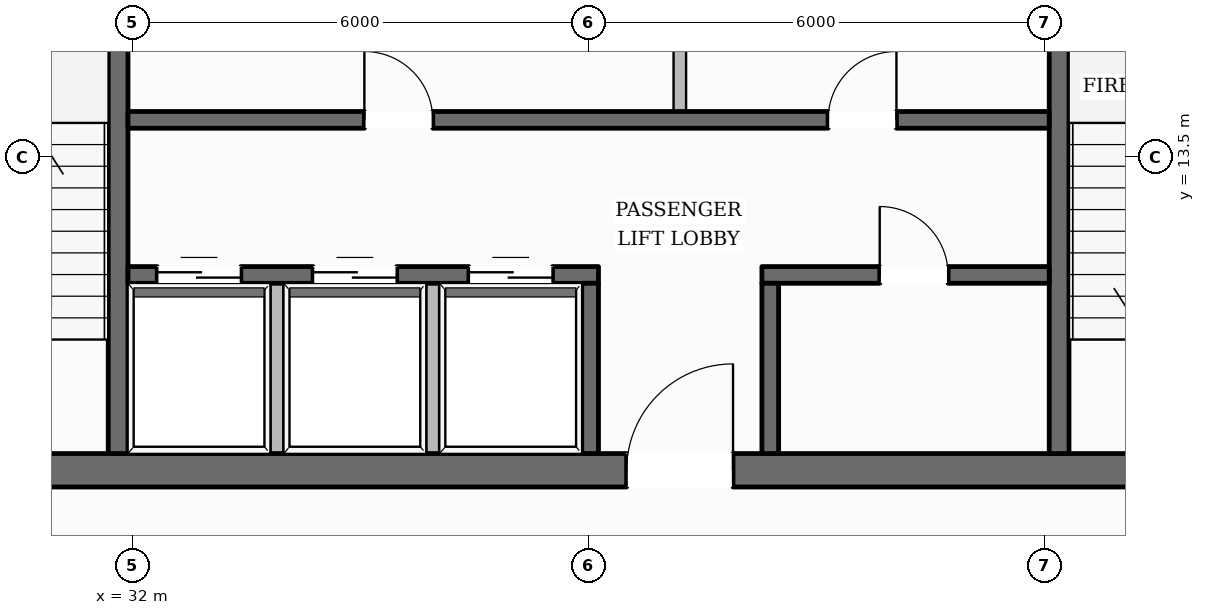
"""IFC4 building model, lengths in metres.
Left out: names, types, materials, properties, quantities, classifications, styles, units other than length and angle.
Written with IfcOpenShell. Run it as: python <this file> out.ifc"""

import sys

from ifc_helpers import new_model, si_unit, direction, frame, frame_2d, origin, place, context, subcontext, project, spatial, rectangle, extrude, element, fill, save


model = new_model("IFC4")
c1 = context("Model", 3, precision=1e-05, world=origin(), true_north=direction((0.0, 1.0)))
c2 = subcontext(c1, "Body", "Model", "MODEL_VIEW")
j1 = project(units=[si_unit("LENGTHUNIT", "METRE"), si_unit("PLANEANGLEUNIT", "RADIAN")], contexts=[c1])
p1 = place(None, origin())
s1 = spatial("IfcSite", under=j1, at=p1, CompositionType="ELEMENT")
p2 = place(p1, origin())
s2 = spatial("IfcBuilding", under=s1, at=p2, CompositionType="ELEMENT")
p3 = place(p2, frame((0.0, 0.0, 188.1)))
s3 = spatial("IfcBuildingStorey", under=s2, at=p3, CompositionType="ELEMENT", Elevation=188.1)
p4 = place(p3, frame((28.04, 9.38, 0.0), z_axis=(0.0, 0.0, 1.0), x_axis=(1.0, 0.0, 0.0)))
e1 = element("IfcWall", 1, at=p4, inside=s3, PredefinedType="SOLIDWALL", context=c2, shape_type="SweptSolid", body=[
    extrude(rectangle(XDim=19.92, YDim=0.44, at=frame_2d((9.96, 0.0))), origin(), (0.0, 0.0, 1.0), 3.6),
])
p5 = place(p4, frame((10.46, 0.0, 0.0)))
e2 = element("IfcOpeningElement", 2, at=p5, cuts=e1, PredefinedType="OPENING", context=c2, shape_type="SweptSolid", body=[
    extrude(rectangle(XDim=1.4, YDim=2.2, at=frame_2d((0.7, 1.1))), frame((0.0, 0.23, 0.0), z_axis=(0.0, -1.0, 0.0), x_axis=(1.0, 0.0, 0.0)), (0.0, 0.0, 1.0), 0.46),
])
p6 = place(p3, frame((31.81, 9.6, 0.0), z_axis=(0.0, 0.0, 1.0), x_axis=(0.0, 1.0, 0.0)))
e3 = element("IfcWall", 3, at=p6, inside=s3, PredefinedType="SHEAR", context=c2, shape_type="SweptSolid", body=[
    extrude(rectangle(XDim=13.0, YDim=0.26, at=frame_2d((6.5, 0.0))), origin(), (0.0, 0.0, 1.0), 3.6),
])
p7 = place(p6, frame((10.925, 0.0, 0.0)))
e4 = element("IfcOpeningElement", 4, at=p7, cuts=e3, PredefinedType="OPENING", context=c2, shape_type="SweptSolid", body=[
    extrude(rectangle(XDim=1.25, YDim=2.25, at=frame_2d((0.625, 1.125))), frame((0.0, 0.14, 0.0), z_axis=(0.0, -1.0, 0.0), x_axis=(1.0, 0.0, 0.0)), (0.0, 0.0, 1.0), 0.28),
])
p8 = place(p3, frame((44.19, 9.6, 0.0), z_axis=(0.0, 0.0, 1.0), x_axis=(0.0, 1.0, 0.0)))
e5 = element("IfcWall", 5, at=p8, inside=s3, PredefinedType="SHEAR", context=c2, shape_type="SweptSolid", body=[
    extrude(rectangle(XDim=13.0, YDim=0.26, at=frame_2d((6.5, 0.0))), origin(), (0.0, 0.0, 1.0), 3.6),
])
p9 = place(p8, frame((10.925, 0.0, 0.0)))
e6 = element("IfcOpeningElement", 6, at=p9, cuts=e5, PredefinedType="OPENING", context=c2, shape_type="SweptSolid", body=[
    extrude(rectangle(XDim=1.25, YDim=2.25, at=frame_2d((0.625, 1.125))), frame((0.0, 0.14, 0.0), z_axis=(0.0, -1.0, 0.0), x_axis=(1.0, 0.0, 0.0)), (0.0, 0.0, 1.0), 0.28),
])
p10 = place(p3, frame((31.94, 13.99, 0.0), z_axis=(0.0, 0.0, 1.0), x_axis=(1.0, 0.0, 0.0)))
e7 = element("IfcWall", 7, at=p10, inside=s3, PredefinedType="SOLIDWALL", context=c2, shape_type="SweptSolid", body=[
    extrude(rectangle(XDim=12.12, YDim=0.22, at=frame_2d((6.06, 0.0))), origin(), (0.0, 0.0, 1.0), 3.6),
])
p11 = place(p10, frame((3.11, 0.0, 0.0)))
e8 = element("IfcOpeningElement", 8, at=p11, cuts=e7, PredefinedType="OPENING", context=c2, shape_type="SweptSolid", body=[
    extrude(rectangle(XDim=0.9, YDim=2.1, at=frame_2d((0.45, 1.05))), frame((0.0, 0.12, 0.0), z_axis=(0.0, -1.0, 0.0), x_axis=(1.0, 0.0, 0.0)), (0.0, 0.0, 1.0), 0.24),
])
p12 = place(p10, frame((9.21, 0.0, 0.0)))
e9 = element("IfcOpeningElement", 9, at=p12, cuts=e7, PredefinedType="OPENING", context=c2, shape_type="SweptSolid", body=[
    extrude(rectangle(XDim=0.9, YDim=2.1, at=frame_2d((0.45, 1.05))), frame((0.0, 0.12, 0.0), z_axis=(0.0, -1.0, 0.0), x_axis=(1.0, 0.0, 0.0)), (0.0, 0.0, 1.0), 0.24),
])
p13 = place(p3, frame((31.94, 11.95, 0.0), z_axis=(0.0, 0.0, 1.0), x_axis=(1.0, 0.0, 0.0)))
e10 = element("IfcWall", 10, at=p13, inside=s3, PredefinedType="SOLIDWALL", context=c2, shape_type="SweptSolid", body=[
    extrude(rectangle(XDim=6.19, YDim=0.22, at=frame_2d((3.095, 0.0))), origin(), (0.0, 0.0, 1.0), 3.6),
])
p14 = place(p13, frame((0.385, 0.0, 0.0)))
e11 = element("IfcOpeningElement", 11, at=p14, cuts=e10, PredefinedType="OPENING", context=c2, shape_type="SweptSolid", body=[
    extrude(rectangle(XDim=1.1, YDim=2.2, at=frame_2d((0.55, 1.1))), frame((0.0, 0.12, 0.0), z_axis=(0.0, -1.0, 0.0), x_axis=(1.0, 0.0, 0.0)), (0.0, 0.0, 1.0), 0.24),
])
p15 = place(p13, frame((2.435, 0.0, 0.0)))
e12 = element("IfcOpeningElement", 12, at=p15, cuts=e10, PredefinedType="OPENING", context=c2, shape_type="SweptSolid", body=[
    extrude(rectangle(XDim=1.1, YDim=2.2, at=frame_2d((0.55, 1.1))), frame((0.0, 0.12, 0.0), z_axis=(0.0, -1.0, 0.0), x_axis=(1.0, 0.0, 0.0)), (0.0, 0.0, 1.0), 0.24),
])
p16 = place(p13, frame((4.485, 0.0, 0.0)))
e13 = element("IfcOpeningElement", 13, at=p16, cuts=e10, PredefinedType="OPENING", context=c2, shape_type="SweptSolid", body=[
    extrude(rectangle(XDim=1.1, YDim=2.2, at=frame_2d((0.55, 1.1))), frame((0.0, 0.12, 0.0), z_axis=(0.0, -1.0, 0.0), x_axis=(1.0, 0.0, 0.0)), (0.0, 0.0, 1.0), 0.24),
])
p17 = place(p3, frame((40.28, 11.95, 0.0), z_axis=(0.0, 0.0, 1.0), x_axis=(1.0, 0.0, 0.0)))
e14 = element("IfcWall", 14, at=p17, inside=s3, PredefinedType="SOLIDWALL", context=c2, shape_type="SweptSolid", body=[
    extrude(rectangle(XDim=3.78, YDim=0.22, at=frame_2d((1.89, 0.0))), origin(), (0.0, 0.0, 1.0), 3.6),
])
p18 = place(p17, frame((1.55, 0.0, 0.0)))
e15 = element("IfcOpeningElement", 15, at=p18, cuts=e14, PredefinedType="OPENING", context=c2, shape_type="SweptSolid", body=[
    extrude(rectangle(XDim=0.9, YDim=2.1, at=frame_2d((0.45, 1.05))), frame((0.0, 0.12, 0.0), z_axis=(0.0, -1.0, 0.0), x_axis=(1.0, 0.0, 0.0)), (0.0, 0.0, 1.0), 0.24),
])
for number, where, z_axis, x_axis in (
    (16, (38.02, 9.6, 0.0), (0.0, 0.0, 1.0), (0.0, 1.0, 0.0)),
    (17, (40.39, 9.6, 0.0), (0.0, 0.0, 1.0), (0.0, 1.0, 0.0)),
):
    element("IfcWall", number, at=place(p3, frame(where, z_axis=z_axis, x_axis=x_axis)), inside=s3, PredefinedType="SOLIDWALL", context=c2, shape_type="SweptSolid", body=[
        extrude(rectangle(XDim=2.24, YDim=0.22, at=frame_2d((1.12, 0.0))), origin(), (0.0, 0.0, 1.0), 3.6),
    ])
p19 = place(p3, frame((15.064, 11.953, 0.0), z_axis=(0.0, 0.0, 1.0), x_axis=(0.495993114815, 0.86832645362, 0.0)))
e18 = element("IfcWall", 18, at=p19, inside=s3, PredefinedType="STANDARD", context=c2, shape_type="SweptSolid", body=[
    extrude(rectangle(XDim=37.324, YDim=0.35, at=frame_2d((18.662, 0.0))), origin(), (0.0, 0.0, 1.0), 3.132),
])
p20 = place(p19, frame((33.087, 0.0, 0.65)))
e19 = element("IfcOpeningElement", 19, at=p20, cuts=e18, PredefinedType="OPENING", context=c2, shape_type="SweptSolid", body=[
    extrude(rectangle(XDim=1.45, YDim=1.75, at=frame_2d((0.725, 0.875))), frame((0.0, 0.185, 0.0), z_axis=(0.0, -1.0, 0.0), x_axis=(1.0, 0.0, 0.0)), (0.0, 0.0, 1.0), 0.37),
])
p21 = place(p19, frame((27.026, 0.0, 0.65)))
e20 = element("IfcOpeningElement", 20, at=p21, cuts=e18, PredefinedType="OPENING", context=c2, shape_type="SweptSolid", body=[
    extrude(rectangle(XDim=1.45, YDim=1.75, at=frame_2d((0.725, 0.875))), frame((0.0, 0.185, 0.0), z_axis=(0.0, -1.0, 0.0), x_axis=(1.0, 0.0, 0.0)), (0.0, 0.0, 1.0), 0.37),
])
p22 = place(p19, frame((14.904, 0.0, 0.65)))
e21 = element("IfcOpeningElement", 21, at=p22, cuts=e18, PredefinedType="OPENING", context=c2, shape_type="SweptSolid", body=[
    extrude(rectangle(XDim=1.45, YDim=1.75, at=frame_2d((0.725, 0.875))), frame((0.0, 0.185, 0.0), z_axis=(0.0, -1.0, 0.0), x_axis=(1.0, 0.0, 0.0)), (0.0, 0.0, 1.0), 0.37),
])
p23 = place(p19, frame((8.844, 0.0, 0.65)))
e22 = element("IfcOpeningElement", 22, at=p23, cuts=e18, PredefinedType="OPENING", context=c2, shape_type="SweptSolid", body=[
    extrude(rectangle(XDim=1.45, YDim=1.75, at=frame_2d((0.725, 0.875))), frame((0.0, 0.185, 0.0), z_axis=(0.0, -1.0, 0.0), x_axis=(1.0, 0.0, 0.0)), (0.0, 0.0, 1.0), 0.37),
])
p24 = place(p19, frame((2.782, 0.0, 0.65)))
e23 = element("IfcOpeningElement", 23, at=p24, cuts=e18, PredefinedType="OPENING", context=c2, shape_type="SweptSolid", body=[
    extrude(rectangle(XDim=1.45, YDim=1.75, at=frame_2d((0.725, 0.875))), frame((0.0, 0.185, 0.0), z_axis=(0.0, -1.0, 0.0), x_axis=(1.0, 0.0, 0.0)), (0.0, 0.0, 1.0), 0.37),
])
p25 = place(p3, frame((42.575, 44.272, 0.0), z_axis=(0.0, 0.0, 1.0), x_axis=(0.503934681705, -0.863741764982, 0.0)))
e24 = element("IfcWall", 24, at=p25, inside=s3, PredefinedType="STANDARD", context=c2, shape_type="SweptSolid", body=[
    extrude(rectangle(XDim=37.915, YDim=0.35, at=frame_2d((18.958, 0.0))), origin(), (0.0, 0.0, 1.0), 3.132),
])
p26 = place(p25, frame((33.633, 0.0, 0.65)))
e25 = element("IfcOpeningElement", 25, at=p26, cuts=e24, PredefinedType="OPENING", context=c2, shape_type="SweptSolid", body=[
    extrude(rectangle(XDim=1.45, YDim=1.75, at=frame_2d((0.725, 0.875))), frame((0.0, 0.185, 0.0), z_axis=(0.0, -1.0, 0.0), x_axis=(1.0, 0.0, 0.0)), (0.0, 0.0, 1.0), 0.37),
])
p27 = place(p25, frame((27.472, 0.0, 0.65)))
e26 = element("IfcOpeningElement", 26, at=p27, cuts=e24, PredefinedType="OPENING", context=c2, shape_type="SweptSolid", body=[
    extrude(rectangle(XDim=1.45, YDim=1.75, at=frame_2d((0.725, 0.875))), frame((0.0, 0.185, 0.0), z_axis=(0.0, -1.0, 0.0), x_axis=(1.0, 0.0, 0.0)), (0.0, 0.0, 1.0), 0.37),
])
p28 = place(p25, frame((15.15, 0.0, 0.65)))
e27 = element("IfcOpeningElement", 27, at=p28, cuts=e24, PredefinedType="OPENING", context=c2, shape_type="SweptSolid", body=[
    extrude(rectangle(XDim=1.45, YDim=1.75, at=frame_2d((0.725, 0.875))), frame((0.0, 0.185, 0.0), z_axis=(0.0, -1.0, 0.0), x_axis=(1.0, 0.0, 0.0)), (0.0, 0.0, 1.0), 0.37),
])
p29 = place(p25, frame((8.989, 0.0, 0.65)))
e28 = element("IfcOpeningElement", 28, at=p29, cuts=e24, PredefinedType="OPENING", context=c2, shape_type="SweptSolid", body=[
    extrude(rectangle(XDim=1.45, YDim=1.75, at=frame_2d((0.725, 0.875))), frame((0.0, 0.185, 0.0), z_axis=(0.0, -1.0, 0.0), x_axis=(1.0, 0.0, 0.0)), (0.0, 0.0, 1.0), 0.37),
])
p30 = place(p25, frame((2.828, 0.0, 0.65)))
e29 = element("IfcOpeningElement", 29, at=p30, cuts=e24, PredefinedType="OPENING", context=c2, shape_type="SweptSolid", body=[
    extrude(rectangle(XDim=1.45, YDim=1.75, at=frame_2d((0.725, 0.875))), frame((0.0, 0.185, 0.0), z_axis=(0.0, -1.0, 0.0), x_axis=(1.0, 0.0, 0.0)), (0.0, 0.0, 1.0), 0.37),
])
for number, where, z_axis, x_axis in (
    (30, (33.9, 9.52, 0.0), (0.0, 0.0, 1.0), (0.0, 1.0, 0.0)),
    (31, (35.95, 9.52, 0.0), (0.0, 0.0, 1.0), (0.0, 1.0, 0.0)),
):
    element("IfcWall", number, at=place(p3, frame(where, z_axis=z_axis, x_axis=x_axis)), inside=s3, PredefinedType="PARTITIONING", context=c2, shape_type="SweptSolid", body=[
        extrude(rectangle(XDim=2.32, YDim=0.165, at=frame_2d((1.16, 0.0))), origin(), (0.0, 0.0, 1.0), 3.6),
    ])
p31 = place(p3, frame((39.2, 14.1, 0.0), z_axis=(0.0, 0.0, 1.0), x_axis=(0.0, 1.0, 0.0)))
e32 = element("IfcWall", 32, at=p31, inside=s3, PredefinedType="PARTITIONING", context=c2, shape_type="SweptSolid", body=[
    extrude(rectangle(XDim=2.24, YDim=0.165, at=frame_2d((1.12, 0.0))), origin(), (0.0, 0.0, 1.0), 3.6),
])
p32 = place(p5, origin())
e33 = element("IfcDoor", 33, at=p32, inside=s3, OperationType="SINGLE_SWING_RIGHT", PredefinedType="DOOR", context=c2, shape_type="SweptSolid", body=[
    extrude(rectangle(XDim=1.4, YDim=2.2, at=frame_2d((0.7, 1.1))), frame((0.0, 0.025, 0.0), z_axis=(0.0, -1.0, 0.0), x_axis=(1.0, 0.0, 0.0)), (0.0, 0.0, 1.0), 0.05),
])
fill(e2, e33)
p33 = place(p14, origin())
e34 = element("IfcDoor", 34, at=p33, inside=s3, OperationType="DOUBLE_DOOR_SLIDING", PredefinedType="DOOR", context=c2, shape_type="SweptSolid", body=[
    extrude(rectangle(XDim=1.1, YDim=2.2, at=frame_2d((0.55, 1.1))), frame((0.0, 0.025, 0.0), z_axis=(0.0, -1.0, 0.0), x_axis=(1.0, 0.0, 0.0)), (0.0, 0.0, 1.0), 0.05),
])
fill(e11, e34)
p34 = place(p15, origin())
e35 = element("IfcDoor", 35, at=p34, inside=s3, OperationType="DOUBLE_DOOR_SLIDING", PredefinedType="DOOR", context=c2, shape_type="SweptSolid", body=[
    extrude(rectangle(XDim=1.1, YDim=2.2, at=frame_2d((0.55, 1.1))), frame((0.0, 0.025, 0.0), z_axis=(0.0, -1.0, 0.0), x_axis=(1.0, 0.0, 0.0)), (0.0, 0.0, 1.0), 0.05),
])
fill(e12, e35)
p35 = place(p16, origin())
e36 = element("IfcDoor", 36, at=p35, inside=s3, OperationType="DOUBLE_DOOR_SLIDING", PredefinedType="DOOR", context=c2, shape_type="SweptSolid", body=[
    extrude(rectangle(XDim=1.1, YDim=2.2, at=frame_2d((0.55, 1.1))), frame((0.0, 0.025, 0.0), z_axis=(0.0, -1.0, 0.0), x_axis=(1.0, 0.0, 0.0)), (0.0, 0.0, 1.0), 0.05),
])
fill(e13, e36)
p36 = place(p11, origin())
e37 = element("IfcDoor", 37, at=p36, inside=s3, OperationType="SINGLE_SWING_LEFT", PredefinedType="DOOR", context=c2, shape_type="SweptSolid", body=[
    extrude(rectangle(XDim=0.9, YDim=2.1, at=frame_2d((0.45, 1.05))), frame((0.0, 0.025, 0.0), z_axis=(0.0, -1.0, 0.0), x_axis=(1.0, 0.0, 0.0)), (0.0, 0.0, 1.0), 0.05),
])
fill(e8, e37)
p37 = place(p12, origin())
e38 = element("IfcDoor", 38, at=p37, inside=s3, OperationType="SINGLE_SWING_RIGHT", PredefinedType="DOOR", context=c2, shape_type="SweptSolid", body=[
    extrude(rectangle(XDim=0.9, YDim=2.1, at=frame_2d((0.45, 1.05))), frame((0.0, 0.025, 0.0), z_axis=(0.0, -1.0, 0.0), x_axis=(1.0, 0.0, 0.0)), (0.0, 0.0, 1.0), 0.05),
])
fill(e9, e38)
p38 = place(p18, origin())
e39 = element("IfcDoor", 39, at=p38, inside=s3, OperationType="SINGLE_SWING_LEFT", PredefinedType="DOOR", context=c2, shape_type="SweptSolid", body=[
    extrude(rectangle(XDim=0.9, YDim=2.1, at=frame_2d((0.45, 1.05))), frame((0.0, 0.025, 0.0), z_axis=(0.0, -1.0, 0.0), x_axis=(1.0, 0.0, 0.0)), (0.0, 0.0, 1.0), 0.05),
])
fill(e15, e39)
save(model, sys.argv[1])
